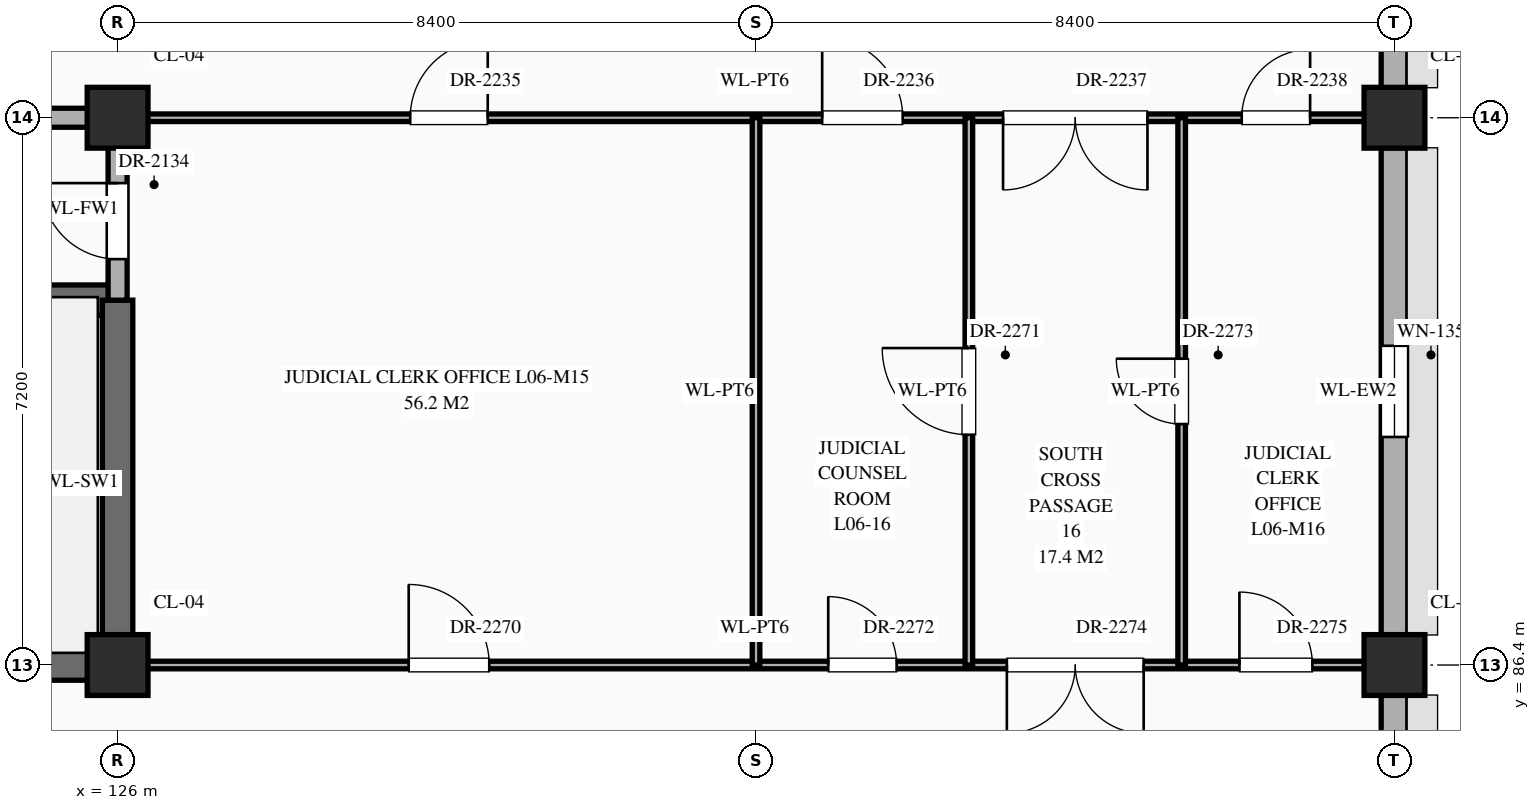
"""IFC4 building model, lengths in metres.
Left out: names, types, materials, properties, quantities, classifications, styles, units other than length and angle.
Written with IfcOpenShell. Run it as: python <this file> out.ifc"""

import sys

from ifc_helpers import new_model, si_unit, direction, frame, frame_2d, origin, origin_2d, place, context, subcontext, project, spatial, rectangle, extrude, element, fill, save


model = new_model("IFC4")
c1 = context("Model", 3, precision=1e-05, world=origin(), true_north=direction((0.0, 1.0)))
c2 = subcontext(c1, "Body", "Model", "MODEL_VIEW")
j1 = project(units=[si_unit("LENGTHUNIT", "METRE"), si_unit("PLANEANGLEUNIT", "RADIAN")], contexts=[c1])
p1 = place(None, origin())
s1 = spatial("IfcSite", under=j1, at=p1, CompositionType="ELEMENT")
p2 = place(p1, origin())
s2 = spatial("IfcBuilding", under=s1, at=p2, CompositionType="ELEMENT")
p3 = place(p2, frame((0.0, 0.0, 26.1)))
s3 = spatial("IfcBuildingStorey", under=s2, at=p3, CompositionType="ELEMENT", Elevation=26.1)
for number, where, z_axis, x_axis in (
    (1, (126.0, 86.4, 0.0), (0.0, 0.0, 1.0), (1.0, 0.0, 0.0)),
    (2, (126.0, 93.6, 0.0), (0.0, 0.0, 1.0), (1.0, 0.0, 0.0)),
    (3, (142.8, 86.4, 0.0), (0.0, 0.0, 1.0), (1.0, 0.0, 0.0)),
    (4, (142.8, 93.6, 0.0), (0.0, 0.0, 1.0), (1.0, 0.0, 0.0)),
):
    element("IfcColumn", number, at=place(p3, frame(where, z_axis=z_axis, x_axis=x_axis)), inside=s3, PredefinedType="COLUMN", context=c2, shape_type="SweptSolid", body=[
        extrude(rectangle(XDim=0.8, YDim=0.8, at=origin_2d()), origin(), (0.0, 0.0, 1.0), 4.5),
    ])
p4 = place(p3, frame((142.8, 79.595, 0.0), z_axis=(0.0, 0.0, 1.0), x_axis=(0.0, 1.0, 0.0)))
e5 = element("IfcWall", 5, at=p4, inside=s3, PredefinedType="STANDARD", context=c2, shape_type="SweptSolid", body=[
    extrude(rectangle(XDim=6.41, YDim=0.35, at=frame_2d((3.205, 0.0))), origin(), (0.0, 0.0, 1.0), 3.59),
])
p5 = place(p4, frame((1.33, 0.0, 0.85)))
e6 = element("IfcOpeningElement", 6, at=p5, cuts=e5, PredefinedType="OPENING", context=c2, shape_type="SweptSolid", body=[
    extrude(rectangle(XDim=1.35, YDim=1.92, at=frame_2d((0.675, 0.96))), frame((0.0, 0.187, 0.0), z_axis=(0.0, -1.0, 0.0), x_axis=(1.0, 0.0, 0.0)), (0.0, 0.0, 1.0), 0.374),
])
p6 = place(p3, frame((142.8, 86.795, 0.0), z_axis=(0.0, 0.0, 1.0), x_axis=(0.0, 1.0, 0.0)))
e7 = element("IfcWall", 7, at=p6, inside=s3, PredefinedType="STANDARD", context=c2, shape_type="SweptSolid", body=[
    extrude(rectangle(XDim=6.41, YDim=0.35, at=frame_2d((3.205, 0.0))), origin(), (0.0, 0.0, 1.0), 3.59),
])
p7 = place(p6, frame((2.605, 0.0, 0.85)))
e8 = element("IfcOpeningElement", 8, at=p7, cuts=e7, PredefinedType="OPENING", context=c2, shape_type="SweptSolid", body=[
    extrude(rectangle(XDim=1.2, YDim=2.12, at=frame_2d((0.6, 1.06))), frame((0.0, 0.187, 0.0), z_axis=(0.0, -1.0, 0.0), x_axis=(1.0, 0.0, 0.0)), (0.0, 0.0, 1.0), 0.374),
])
p8 = place(p3, frame((142.8, 93.995, 0.0), z_axis=(0.0, 0.0, 1.0), x_axis=(0.0, 1.0, 0.0)))
e9 = element("IfcWall", 9, at=p8, inside=s3, PredefinedType="STANDARD", context=c2, shape_type="SweptSolid", body=[
    extrude(rectangle(XDim=6.41, YDim=0.35, at=frame_2d((3.205, 0.0))), origin(), (0.0, 0.0, 1.0), 3.59),
])
p9 = place(p8, frame((4.055, 0.0, 0.85)))
e10 = element("IfcOpeningElement", 10, at=p9, cuts=e9, PredefinedType="OPENING", context=c2, shape_type="SweptSolid", body=[
    extrude(rectangle(XDim=0.9, YDim=1.2, at=frame_2d((0.45, 0.6))), frame((0.0, 0.187, 0.0), z_axis=(0.0, -1.0, 0.0), x_axis=(1.0, 0.0, 0.0)), (0.0, 0.0, 1.0), 0.374),
])
p10 = place(p3, frame((117.6, 86.4, 0.0), z_axis=(0.0, 0.0, 1.0), x_axis=(1.0, 0.0, 0.0)))
e11 = element("IfcWall", 11, at=p10, inside=s3, PredefinedType="SHEAR", context=c2, shape_type="SweptSolid", body=[
    extrude(rectangle(XDim=8.4, YDim=0.4, at=frame_2d((4.2, 0.0))), origin(), (0.0, 0.0, 1.0), 4.24),
])
p11 = place(p3, frame((126.0, 86.4, 0.0), z_axis=(0.0, 0.0, 1.0), x_axis=(1.0, 0.0, 0.0)))
e12 = element("IfcWall", 12, at=p11, inside=s3, PredefinedType="STANDARD", context=c2, shape_type="SweptSolid", body=[
    extrude(rectangle(XDim=16.76, YDim=0.1, at=frame_2d((8.38, 0.0))), origin(), (0.0, 0.0, 1.0), 3.19),
])
p12 = place(p11, frame((3.83, 0.0, 0.0)))
e13 = element("IfcOpeningElement", 13, at=p12, cuts=e12, PredefinedType="OPENING", context=c2, shape_type="SweptSolid", body=[
    extrude(rectangle(XDim=1.06, YDim=2.4, at=frame_2d((0.53, 1.2))), frame((0.0, 0.062, 0.0), z_axis=(0.0, -1.0, 0.0), x_axis=(1.0, 0.0, 0.0)), (0.0, 0.0, 1.0), 0.124),
])
p13 = place(p11, frame((9.35, 0.0, 0.0)))
e14 = element("IfcOpeningElement", 14, at=p13, cuts=e12, PredefinedType="OPENING", context=c2, shape_type="SweptSolid", body=[
    extrude(rectangle(XDim=0.9, YDim=2.15, at=frame_2d((0.45, 1.075))), frame((0.0, 0.062, 0.0), z_axis=(0.0, -1.0, 0.0), x_axis=(1.0, 0.0, 0.0)), (0.0, 0.0, 1.0), 0.124),
])
p14 = place(p11, frame((11.7, 0.0, 0.0)))
e15 = element("IfcOpeningElement", 15, at=p14, cuts=e12, PredefinedType="OPENING", context=c2, shape_type="SweptSolid", body=[
    extrude(rectangle(XDim=1.8, YDim=2.5, at=frame_2d((0.9, 1.25))), frame((0.0, 0.062, 0.0), z_axis=(0.0, -1.0, 0.0), x_axis=(1.0, 0.0, 0.0)), (0.0, 0.0, 1.0), 0.124),
])
p15 = place(p11, frame((14.76, 0.0, 0.0)))
e16 = element("IfcOpeningElement", 16, at=p15, cuts=e12, PredefinedType="OPENING", context=c2, shape_type="SweptSolid", body=[
    extrude(rectangle(XDim=0.96, YDim=2.2, at=frame_2d((0.48, 1.1))), frame((0.0, 0.062, 0.0), z_axis=(0.0, -1.0, 0.0), x_axis=(1.0, 0.0, 0.0)), (0.0, 0.0, 1.0), 0.124),
])
p16 = place(p3, frame((117.6, 91.2, 0.0), z_axis=(0.0, 0.0, 1.0), x_axis=(1.0, 0.0, 0.0)))
e17 = element("IfcWall", 17, at=p16, inside=s3, PredefinedType="SHEAR", context=c2, shape_type="SweptSolid", body=[
    extrude(rectangle(XDim=8.4, YDim=0.4, at=frame_2d((4.2, 0.0))), origin(), (0.0, 0.0, 1.0), 4.24),
])
p17 = place(p16, frame((0.65, 0.0, 0.0)))
e18 = element("IfcOpeningElement", 18, at=p17, cuts=e17, PredefinedType="OPENING", context=c2, shape_type="SweptSolid", body=[
    extrude(rectangle(XDim=1.1, YDim=2.2, at=frame_2d((0.55, 1.1))), frame((0.0, 0.212, 0.0), z_axis=(0.0, -1.0, 0.0), x_axis=(1.0, 0.0, 0.0)), (0.0, 0.0, 1.0), 0.424),
])
p18 = place(p3, frame((117.6, 93.6, 0.0), z_axis=(0.0, 0.0, 1.0), x_axis=(1.0, 0.0, 0.0)))
e19 = element("IfcWall", 19, at=p18, inside=s3, PredefinedType="STANDARD", context=c2, shape_type="SweptSolid", body=[
    extrude(rectangle(XDim=8.4, YDim=0.25, at=frame_2d((4.2, 0.0))), origin(), (0.0, 0.0, 1.0), 3.39),
])
p19 = place(p18, frame((3.45, 0.0, 0.0)))
e20 = element("IfcOpeningElement", 20, at=p19, cuts=e19, PredefinedType="OPENING", context=c2, shape_type="SweptSolid", body=[
    extrude(rectangle(XDim=1.5, YDim=2.25, at=frame_2d((0.75, 1.125))), frame((0.0, 0.137, 0.0), z_axis=(0.0, -1.0, 0.0), x_axis=(1.0, 0.0, 0.0)), (0.0, 0.0, 1.0), 0.274),
])
p20 = place(p3, frame((126.0, 93.6, 0.0), z_axis=(0.0, 0.0, 1.0), x_axis=(1.0, 0.0, 0.0)))
e21 = element("IfcWall", 21, at=p20, inside=s3, PredefinedType="STANDARD", context=c2, shape_type="SweptSolid", body=[
    extrude(rectangle(XDim=16.76, YDim=0.1, at=frame_2d((8.38, 0.0))), origin(), (0.0, 0.0, 1.0), 3.19),
])
p21 = place(p20, frame((3.85, 0.0, 0.0)))
e22 = element("IfcOpeningElement", 22, at=p21, cuts=e21, PredefinedType="OPENING", context=c2, shape_type="SweptSolid", body=[
    extrude(rectangle(XDim=1.02, YDim=2.4, at=frame_2d((0.51, 1.2))), frame((0.0, 0.062, 0.0), z_axis=(0.0, -1.0, 0.0), x_axis=(1.0, 0.0, 0.0)), (0.0, 0.0, 1.0), 0.124),
])
p22 = place(p20, frame((9.27, 0.0, 0.0)))
e23 = element("IfcOpeningElement", 23, at=p22, cuts=e21, PredefinedType="OPENING", context=c2, shape_type="SweptSolid", body=[
    extrude(rectangle(XDim=1.06, YDim=2.4, at=frame_2d((0.53, 1.2))), frame((0.0, 0.062, 0.0), z_axis=(0.0, -1.0, 0.0), x_axis=(1.0, 0.0, 0.0)), (0.0, 0.0, 1.0), 0.124),
])
p23 = place(p20, frame((11.65, 0.0, 0.0)))
e24 = element("IfcOpeningElement", 24, at=p23, cuts=e21, PredefinedType="OPENING", context=c2, shape_type="SweptSolid", body=[
    extrude(rectangle(XDim=1.9, YDim=2.5, at=frame_2d((0.95, 1.25))), frame((0.0, 0.062, 0.0), z_axis=(0.0, -1.0, 0.0), x_axis=(1.0, 0.0, 0.0)), (0.0, 0.0, 1.0), 0.124),
])
p24 = place(p20, frame((14.79, 0.0, 0.0)))
e25 = element("IfcOpeningElement", 25, at=p24, cuts=e21, PredefinedType="OPENING", context=c2, shape_type="SweptSolid", body=[
    extrude(rectangle(XDim=0.9, YDim=2.15, at=frame_2d((0.45, 1.075))), frame((0.0, 0.062, 0.0), z_axis=(0.0, -1.0, 0.0), x_axis=(1.0, 0.0, 0.0)), (0.0, 0.0, 1.0), 0.124),
])
p25 = place(p3, frame((126.0, 86.4, 0.0), z_axis=(0.0, 0.0, 1.0), x_axis=(0.0, 1.0, 0.0)))
e26 = element("IfcWall", 26, at=p25, inside=s3, PredefinedType="SHEAR", context=c2, shape_type="SweptSolid", body=[
    extrude(rectangle(XDim=4.8, YDim=0.4, at=frame_2d((2.4, 0.0))), origin(), (0.0, 0.0, 1.0), 4.24),
])
p26 = place(p3, frame((126.0, 91.2, 0.0), z_axis=(0.0, 0.0, 1.0), x_axis=(0.0, 1.0, 0.0)))
e27 = element("IfcWall", 27, at=p26, inside=s3, PredefinedType="STANDARD", context=c2, shape_type="SweptSolid", body=[
    extrude(rectangle(XDim=2.4, YDim=0.25, at=frame_2d((1.2, 0.0))), origin(), (0.0, 0.0, 1.0), 3.49),
])
p27 = place(p26, frame((0.54, 0.0, 0.0)))
e28 = element("IfcOpeningElement", 28, at=p27, cuts=e27, PredefinedType="OPENING", context=c2, shape_type="SweptSolid", body=[
    extrude(rectangle(XDim=1.0, YDim=2.2, at=frame_2d((0.5, 1.1))), frame((0.0, 0.137, 0.0), z_axis=(0.0, -1.0, 0.0), x_axis=(1.0, 0.0, 0.0)), (0.0, 0.0, 1.0), 0.274),
])
p28 = place(p3, frame((134.4, 86.4, 0.0), z_axis=(0.0, 0.0, 1.0), x_axis=(0.0, 1.0, 0.0)))
e29 = element("IfcWall", 29, at=p28, inside=s3, PredefinedType="STANDARD", context=c2, shape_type="SweptSolid", body=[
    extrude(rectangle(XDim=7.2, YDim=0.1, at=frame_2d((3.6, 0.0))), origin(), (0.0, 0.0, 1.0), 4.24),
])
p29 = place(p3, frame((137.2, 86.4, 0.0), z_axis=(0.0, 0.0, 1.0), x_axis=(0.0, 1.0, 0.0)))
e30 = element("IfcWall", 30, at=p29, inside=s3, PredefinedType="STANDARD", context=c2, shape_type="SweptSolid", body=[
    extrude(rectangle(XDim=7.2, YDim=0.1, at=frame_2d((3.6, 0.0))), origin(), (0.0, 0.0, 1.0), 4.24),
])
p30 = place(p29, frame((3.03, 0.0, 0.0)))
e31 = element("IfcOpeningElement", 31, at=p30, cuts=e30, PredefinedType="OPENING", context=c2, shape_type="SweptSolid", body=[
    extrude(rectangle(XDim=1.14, YDim=2.4, at=frame_2d((0.57, 1.2))), frame((0.0, 0.062, 0.0), z_axis=(0.0, -1.0, 0.0), x_axis=(1.0, 0.0, 0.0)), (0.0, 0.0, 1.0), 0.124),
])
p31 = place(p3, frame((140.0, 86.4, 0.0), z_axis=(0.0, 0.0, 1.0), x_axis=(0.0, 1.0, 0.0)))
e32 = element("IfcWall", 32, at=p31, inside=s3, PredefinedType="STANDARD", context=c2, shape_type="SweptSolid", body=[
    extrude(rectangle(XDim=7.2, YDim=0.1, at=frame_2d((3.6, 0.0))), origin(), (0.0, 0.0, 1.0), 4.24),
])
p32 = place(p31, frame((3.17, 0.0, 0.0)))
e33 = element("IfcOpeningElement", 33, at=p32, cuts=e32, PredefinedType="OPENING", context=c2, shape_type="SweptSolid", body=[
    extrude(rectangle(XDim=0.86, YDim=2.1, at=frame_2d((0.43, 1.05))), frame((0.0, 0.062, 0.0), z_axis=(0.0, -1.0, 0.0), x_axis=(1.0, 0.0, 0.0)), (0.0, 0.0, 1.0), 0.124),
])
p33 = place(p7, origin())
e34 = element("IfcWindow", 34, at=p33, inside=s3, PartitioningType="SINGLE_PANEL", PredefinedType="WINDOW", context=c2, shape_type="SweptSolid", body=[
    extrude(rectangle(XDim=1.2, YDim=2.12, at=frame_2d((0.6, 1.06))), frame((0.0, 0.03, 0.0), z_axis=(0.0, -1.0, 0.0), x_axis=(1.0, 0.0, 0.0)), (0.0, 0.0, 1.0), 0.06),
])
fill(e8, e34)
p34 = place(p27, origin())
e35 = element("IfcDoor", 35, at=p34, inside=s3, OperationType="SINGLE_SWING_RIGHT", PredefinedType="DOOR", context=c2, shape_type="SweptSolid", body=[
    extrude(rectangle(XDim=1.0, YDim=2.2, at=frame_2d((0.5, 1.1))), frame((0.0, 0.025, 0.0), z_axis=(0.0, -1.0, 0.0), x_axis=(1.0, 0.0, 0.0)), (0.0, 0.0, 1.0), 0.05),
])
fill(e28, e35)
p35 = place(p21, origin())
e36 = element("IfcDoor", 36, at=p35, inside=s3, OperationType="SINGLE_SWING_RIGHT", PredefinedType="DOOR", context=c2, shape_type="SweptSolid", body=[
    extrude(rectangle(XDim=1.02, YDim=2.4, at=frame_2d((0.51, 1.2))), frame((0.0, 0.025, 0.0), z_axis=(0.0, -1.0, 0.0), x_axis=(1.0, 0.0, 0.0)), (0.0, 0.0, 1.0), 0.05),
])
fill(e22, e36)
p36 = place(p22, origin())
e37 = element("IfcDoor", 37, at=p36, inside=s3, OperationType="SINGLE_SWING_LEFT", PredefinedType="DOOR", context=c2, shape_type="SweptSolid", body=[
    extrude(rectangle(XDim=1.06, YDim=2.4, at=frame_2d((0.53, 1.2))), frame((0.0, 0.025, 0.0), z_axis=(0.0, -1.0, 0.0), x_axis=(1.0, 0.0, 0.0)), (0.0, 0.0, 1.0), 0.05),
])
fill(e23, e37)
p37 = place(p23, frame((1.9, 0.0, 0.0), z_axis=(0.0, 0.0, 1.0), x_axis=(-1.0, 0.0, 0.0)))
e38 = element("IfcDoor", 38, at=p37, inside=s3, OperationType="DOUBLE_DOOR_SINGLE_SWING", PredefinedType="DOOR", context=c2, shape_type="SweptSolid", body=[
    extrude(rectangle(XDim=1.9, YDim=2.5, at=frame_2d((0.95, 1.25))), frame((0.0, 0.025, 0.0), z_axis=(0.0, -1.0, 0.0), x_axis=(1.0, 0.0, 0.0)), (0.0, 0.0, 1.0), 0.05),
])
fill(e24, e38)
p38 = place(p24, origin())
e39 = element("IfcDoor", 39, at=p38, inside=s3, OperationType="SINGLE_SWING_RIGHT", PredefinedType="DOOR", context=c2, shape_type="SweptSolid", body=[
    extrude(rectangle(XDim=0.9, YDim=2.15, at=frame_2d((0.45, 1.075))), frame((0.0, 0.025, 0.0), z_axis=(0.0, -1.0, 0.0), x_axis=(1.0, 0.0, 0.0)), (0.0, 0.0, 1.0), 0.05),
])
fill(e25, e39)
p39 = place(p12, origin())
e40 = element("IfcDoor", 40, at=p39, inside=s3, OperationType="SINGLE_SWING_LEFT", PredefinedType="DOOR", context=c2, shape_type="SweptSolid", body=[
    extrude(rectangle(XDim=1.06, YDim=2.4, at=frame_2d((0.53, 1.2))), frame((0.0, 0.025, 0.0), z_axis=(0.0, -1.0, 0.0), x_axis=(1.0, 0.0, 0.0)), (0.0, 0.0, 1.0), 0.05),
])
fill(e13, e40)
p40 = place(p30, origin())
e41 = element("IfcDoor", 41, at=p40, inside=s3, OperationType="SINGLE_SWING_RIGHT", PredefinedType="DOOR", context=c2, shape_type="SweptSolid", body=[
    extrude(rectangle(XDim=1.14, YDim=2.4, at=frame_2d((0.57, 1.2))), frame((0.0, 0.025, 0.0), z_axis=(0.0, -1.0, 0.0), x_axis=(1.0, 0.0, 0.0)), (0.0, 0.0, 1.0), 0.05),
])
fill(e31, e41)
p41 = place(p13, origin())
e42 = element("IfcDoor", 42, at=p41, inside=s3, OperationType="SINGLE_SWING_LEFT", PredefinedType="DOOR", context=c2, shape_type="SweptSolid", body=[
    extrude(rectangle(XDim=0.9, YDim=2.15, at=frame_2d((0.45, 1.075))), frame((0.0, 0.025, 0.0), z_axis=(0.0, -1.0, 0.0), x_axis=(1.0, 0.0, 0.0)), (0.0, 0.0, 1.0), 0.05),
])
fill(e14, e42)
p42 = place(p32, origin())
e43 = element("IfcDoor", 43, at=p42, inside=s3, OperationType="SINGLE_SWING_RIGHT", PredefinedType="DOOR", context=c2, shape_type="SweptSolid", body=[
    extrude(rectangle(XDim=0.86, YDim=2.1, at=frame_2d((0.43, 1.05))), frame((0.0, 0.025, 0.0), z_axis=(0.0, -1.0, 0.0), x_axis=(1.0, 0.0, 0.0)), (0.0, 0.0, 1.0), 0.05),
])
fill(e33, e43)
p43 = place(p14, frame((1.8, 0.0, 0.0), z_axis=(0.0, 0.0, 1.0), x_axis=(-1.0, 0.0, 0.0)))
e44 = element("IfcDoor", 44, at=p43, inside=s3, OperationType="DOUBLE_DOOR_SINGLE_SWING", PredefinedType="DOOR", context=c2, shape_type="SweptSolid", body=[
    extrude(rectangle(XDim=1.8, YDim=2.5, at=frame_2d((0.9, 1.25))), frame((0.0, 0.025, 0.0), z_axis=(0.0, -1.0, 0.0), x_axis=(1.0, 0.0, 0.0)), (0.0, 0.0, 1.0), 0.05),
])
fill(e15, e44)
p44 = place(p15, origin())
e45 = element("IfcDoor", 45, at=p44, inside=s3, OperationType="SINGLE_SWING_LEFT", PredefinedType="DOOR", context=c2, shape_type="SweptSolid", body=[
    extrude(rectangle(XDim=0.96, YDim=2.2, at=frame_2d((0.48, 1.1))), frame((0.0, 0.025, 0.0), z_axis=(0.0, -1.0, 0.0), x_axis=(1.0, 0.0, 0.0)), (0.0, 0.0, 1.0), 0.05),
])
fill(e16, e45)
save(model, sys.argv[1])
